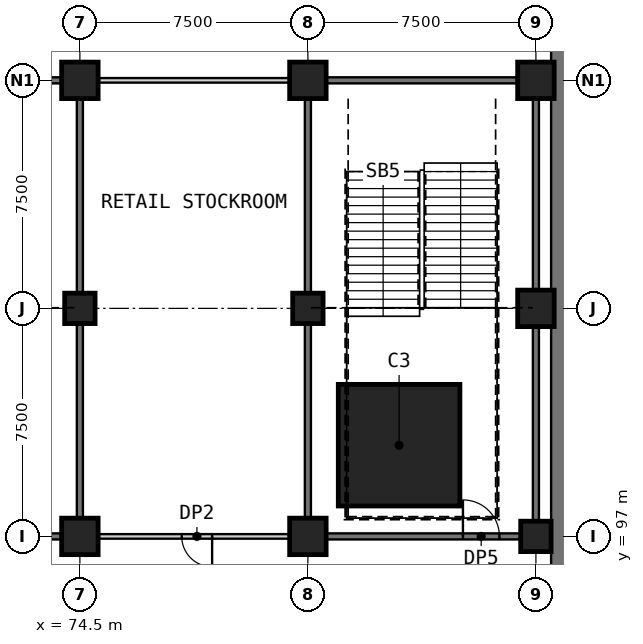
"""IFC4 building model, lengths in metres.
Left out: names, types, materials, properties, quantities, classifications, styles, units other than length and angle.
Written with IfcOpenShell. Run it as: python <this file> out.ifc"""

import sys

from ifc_helpers import new_model, si_unit, direction, frame, frame_2d, origin, origin_2d, place, context, subcontext, project, spatial, rectangle, extrude, element, fill, save


model = new_model("IFC4")
c1 = context("Model", 3, precision=1e-05, world=origin(), true_north=direction((0.0, 1.0)))
c2 = subcontext(c1, "Body", "Model", "MODEL_VIEW")
j1 = project(units=[si_unit("LENGTHUNIT", "METRE"), si_unit("PLANEANGLEUNIT", "RADIAN")], contexts=[c1])
p1 = place(None, origin())
s1 = spatial("IfcSite", under=j1, at=p1, CompositionType="ELEMENT")
p2 = place(p1, origin())
s2 = spatial("IfcBuilding", under=s1, at=p2, CompositionType="ELEMENT")
p3 = place(p2, frame((0.0, 0.0, -6.0)))
s3 = spatial("IfcBuildingStorey", under=s2, at=p3, CompositionType="ELEMENT", Elevation=-6.0)
p4 = place(p3, frame((90.5, 25.0, 0.0), z_axis=(0.0, 0.0, 1.0), x_axis=(0.0, 1.0, 0.0)))
e1 = element("IfcWall", 1, at=p4, inside=s3, PredefinedType="SHEAR", context=c2, shape_type="SweptSolid", body=[
    extrude(rectangle(XDim=92.5, YDim=1.0, at=frame_2d((46.25, 0.0))), origin(), (0.0, 0.0, 1.0), 4.8),
])
p5 = place(p4, frame((23.15, 0.0, 0.0)))
e2 = element("IfcOpeningElement", 2, at=p5, cuts=e1, PredefinedType="OPENING", context=c2, shape_type="SweptSolid", body=[
    extrude(rectangle(XDim=1.5, YDim=2.1, at=frame_2d((0.75, 1.05))), frame((0.0, 0.51, 0.0), z_axis=(0.0, -1.0, 0.0), x_axis=(1.0, 0.0, 0.0)), (0.0, 0.0, 1.0), 1.02),
])
p6 = place(p4, frame((67.75, 0.0, 0.0)))
e3 = element("IfcOpeningElement", 3, at=p6, cuts=e1, PredefinedType="OPENING", context=c2, shape_type="SweptSolid", body=[
    extrude(rectangle(XDim=1.5, YDim=2.1, at=frame_2d((0.75, 1.05))), frame((0.0, 0.51, 0.0), z_axis=(0.0, -1.0, 0.0), x_axis=(1.0, 0.0, 0.0)), (0.0, 0.0, 1.0), 1.02),
])
p7 = place(p3, frame((74.5, 97.0, 0.0), z_axis=(0.0, 0.0, 1.0), x_axis=(1.0, 0.0, 0.0)))
e4 = element("IfcColumn", 4, at=p7, inside=s3, PredefinedType="COLUMN", context=c2, shape_type="SweptSolid", body=[
    extrude(rectangle(XDim=1.2, YDim=1.2, at=origin_2d()), origin(), (0.0, 0.0, 1.0), 6.0),
])
p8 = place(p3, frame((74.5, 104.5, 0.0), z_axis=(0.0, 0.0, 1.0), x_axis=(1.0, 0.0, 0.0)))
e5 = element("IfcColumn", 5, at=p8, inside=s3, PredefinedType="COLUMN", context=c2, shape_type="SweptSolid", body=[
    extrude(rectangle(XDim=1.0, YDim=1.0, at=origin_2d()), origin(), (0.0, 0.0, 1.0), 6.0),
])
p9 = place(p3, frame((82.0, 97.0, 0.0), z_axis=(0.0, 0.0, 1.0), x_axis=(1.0, 0.0, 0.0)))
e6 = element("IfcColumn", 6, at=p9, inside=s3, PredefinedType="COLUMN", context=c2, shape_type="SweptSolid", body=[
    extrude(rectangle(XDim=1.2, YDim=1.2, at=origin_2d()), origin(), (0.0, 0.0, 1.0), 6.0),
])
for number, where, z_axis, x_axis in (
    (7, (82.0, 104.5, 0.0), (0.0, 0.0, 1.0), (1.0, 0.0, 0.0)),
    (8, (89.5, 97.0, 0.0), (0.0, 0.0, 1.0), (1.0, 0.0, 0.0)),
):
    element("IfcColumn", number, at=place(p3, frame(where, z_axis=z_axis, x_axis=x_axis)), inside=s3, PredefinedType="COLUMN", context=c2, shape_type="SweptSolid", body=[
        extrude(rectangle(XDim=1.0, YDim=1.0, at=origin_2d()), origin(), (0.0, 0.0, 1.0), 6.0),
    ])
p10 = place(p3, frame((85.0, 100.0, 0.0), z_axis=(0.0, 0.0, 1.0), x_axis=(1.0, 0.0, 0.0)))
e9 = element("IfcColumn", 9, at=p10, inside=s3, PredefinedType="COLUMN", context=c2, shape_type="SweptSolid", body=[
    extrude(rectangle(XDim=4.0, YDim=4.0, at=origin_2d()), origin(), (0.0, 0.0, 1.0), 6.0),
])
for number, where, z_axis, x_axis in (
    (10, (74.5, 112.0, 0.0), (0.0, 0.0, 1.0), (1.0, 0.0, 0.0)),
    (11, (82.0, 112.0, 0.0), (0.0, 0.0, 1.0), (1.0, 0.0, 0.0)),
    (12, (89.5, 104.5, 0.0), (0.0, 0.0, 1.0), (1.0, 0.0, 0.0)),
    (13, (89.5, 112.0, 0.0), (0.0, 0.0, 1.0), (1.0, 0.0, 0.0)),
):
    element("IfcColumn", number, at=place(p3, frame(where, z_axis=z_axis, x_axis=x_axis)), inside=s3, PredefinedType="COLUMN", context=c2, shape_type="SweptSolid", body=[
        extrude(rectangle(XDim=1.2, YDim=1.2, at=origin_2d()), origin(), (0.0, 0.0, 1.0), 6.0),
    ])
p11 = place(p3, frame((68.1, 97.0, 0.0), z_axis=(0.0, 0.0, 1.0), x_axis=(1.0, 0.0, 0.0)))
e14 = element("IfcWall", 14, at=p11, inside=s3, PredefinedType="SHEAR", context=c2, shape_type="SweptSolid", body=[
    extrude(rectangle(XDim=5.8, YDim=0.2, at=frame_2d((2.9, 0.0))), origin(), (0.0, 0.0, 1.0), 5.7),
])
p12 = place(p11, frame((2.25, 0.0, 0.0)))
e15 = element("IfcOpeningElement", 15, at=p12, cuts=e14, PredefinedType="OPENING", context=c2, shape_type="SweptSolid", body=[
    extrude(rectangle(XDim=1.2, YDim=2.1, at=frame_2d((0.6, 1.05))), frame((0.0, 0.11, 0.0), z_axis=(0.0, -1.0, 0.0), x_axis=(1.0, 0.0, 0.0)), (0.0, 0.0, 1.0), 0.22),
])
p13 = place(p3, frame((81.4, 97.0, 0.0), z_axis=(0.0, 0.0, 1.0), x_axis=(-1.0, 0.0, 0.0)))
e16 = element("IfcWall", 16, at=p13, inside=s3, PredefinedType="PARTITIONING", context=c2, shape_type="SweptSolid", body=[
    extrude(rectangle(XDim=6.3, YDim=0.15, at=frame_2d((3.15, 0.0))), origin(), (0.0, 0.0, 1.0), 5.7),
])
p14 = place(p13, frame((2.55, 0.0, 0.0)))
e17 = element("IfcOpeningElement", 17, at=p14, cuts=e16, PredefinedType="OPENING", context=c2, shape_type="SweptSolid", body=[
    extrude(rectangle(XDim=1.0, YDim=2.1, at=frame_2d((0.5, 1.05))), frame((0.0, 0.085, 0.0), z_axis=(0.0, -1.0, 0.0), x_axis=(1.0, 0.0, 0.0)), (0.0, 0.0, 1.0), 0.17),
])
p15 = place(p3, frame((82.6, 97.0, 0.0), z_axis=(0.0, 0.0, 1.0), x_axis=(1.0, 0.0, 0.0)))
e18 = element("IfcWall", 18, at=p15, inside=s3, PredefinedType="SHEAR", context=c2, shape_type="SweptSolid", body=[
    extrude(rectangle(XDim=6.4, YDim=0.2, at=frame_2d((3.2, 0.0))), origin(), (0.0, 0.0, 1.0), 5.7),
])
p16 = place(p15, frame((4.5, 0.0, 0.0)))
e19 = element("IfcOpeningElement", 19, at=p16, cuts=e18, PredefinedType="OPENING", context=c2, shape_type="SweptSolid", body=[
    extrude(rectangle(XDim=1.2, YDim=2.1, at=frame_2d((0.6, 1.05))), frame((0.0, 0.11, 0.0), z_axis=(0.0, -1.0, 0.0), x_axis=(1.0, 0.0, 0.0)), (0.0, 0.0, 1.0), 0.22),
])
p17 = place(p3, frame((68.1, 112.0, 0.0), z_axis=(0.0, 0.0, 1.0), x_axis=(1.0, 0.0, 0.0)))
e20 = element("IfcWall", 20, at=p17, inside=s3, PredefinedType="SHEAR", context=c2, shape_type="SweptSolid", body=[
    extrude(rectangle(XDim=5.8, YDim=0.2, at=frame_2d((2.9, 0.0))), origin(), (0.0, 0.0, 1.0), 5.1),
])
p18 = place(p3, frame((75.1, 112.0, 0.0), z_axis=(0.0, 0.0, 1.0), x_axis=(1.0, 0.0, 0.0)))
e21 = element("IfcWall", 21, at=p18, inside=s3, PredefinedType="PARTITIONING", context=c2, shape_type="SweptSolid", body=[
    extrude(rectangle(XDim=6.3, YDim=0.15, at=frame_2d((3.15, 0.0))), origin(), (0.0, 0.0, 1.0), 5.1),
])
p19 = place(p3, frame((82.6, 112.0, 0.0), z_axis=(0.0, 0.0, 1.0), x_axis=(1.0, 0.0, 0.0)))
e22 = element("IfcWall", 22, at=p19, inside=s3, PredefinedType="SHEAR", context=c2, shape_type="SweptSolid", body=[
    extrude(rectangle(XDim=6.3, YDim=0.2, at=frame_2d((3.15, 0.0))), origin(), (0.0, 0.0, 1.0), 5.1),
])
for number, where, z_axis, x_axis in (
    (23, (74.5, 97.6, 0.0), (0.0, 0.0, 1.0), (0.0, 1.0, 0.0)),
    (24, (74.5, 105.0, 0.0), (0.0, 0.0, 1.0), (0.0, 1.0, 0.0)),
    (25, (82.0, 97.6, 0.0), (0.0, 0.0, 1.0), (0.0, 1.0, 0.0)),
    (26, (82.0, 105.0, 0.0), (0.0, 0.0, 1.0), (0.0, 1.0, 0.0)),
    (27, (89.5, 97.5, 0.0), (0.0, 0.0, 1.0), (0.0, 1.0, 0.0)),
):
    element("IfcWall", number, at=place(p3, frame(where, z_axis=z_axis, x_axis=x_axis)), inside=s3, PredefinedType="SHEAR", context=c2, shape_type="SweptSolid", body=[
        extrude(rectangle(XDim=6.4, YDim=0.2, at=frame_2d((3.2, 0.0))), origin(), (0.0, 0.0, 1.0), 5.7),
    ])
p20 = place(p3, frame((89.5, 105.1, 0.0), z_axis=(0.0, 0.0, 1.0), x_axis=(0.0, 1.0, 0.0)))
e28 = element("IfcWall", 28, at=p20, inside=s3, PredefinedType="SHEAR", context=c2, shape_type="SweptSolid", body=[
    extrude(rectangle(XDim=6.3, YDim=0.2, at=frame_2d((3.15, 0.0))), origin(), (0.0, 0.0, 1.0), 5.7),
])
p21 = place(p14, origin())
e29 = element("IfcDoor", 29, at=p21, inside=s3, OperationType="SINGLE_SWING_LEFT", PredefinedType="DOOR", context=c2, shape_type="SweptSolid", body=[
    extrude(rectangle(XDim=1.0, YDim=2.1, at=frame_2d((0.5, 1.05))), frame((0.0, 0.025, 0.0), z_axis=(0.0, -1.0, 0.0), x_axis=(1.0, 0.0, 0.0)), (0.0, 0.0, 1.0), 0.05),
])
fill(e17, e29)
p22 = place(p16, origin())
e30 = element("IfcDoor", 30, at=p22, inside=s3, OperationType="SINGLE_SWING_LEFT", PredefinedType="DOOR", context=c2, shape_type="SweptSolid", body=[
    extrude(rectangle(XDim=1.2, YDim=2.1, at=frame_2d((0.6, 1.05))), frame((0.0, 0.025, 0.0), z_axis=(0.0, -1.0, 0.0), x_axis=(1.0, 0.0, 0.0)), (0.0, 0.0, 1.0), 0.05),
])
fill(e19, e30)
save(model, sys.argv[1])
